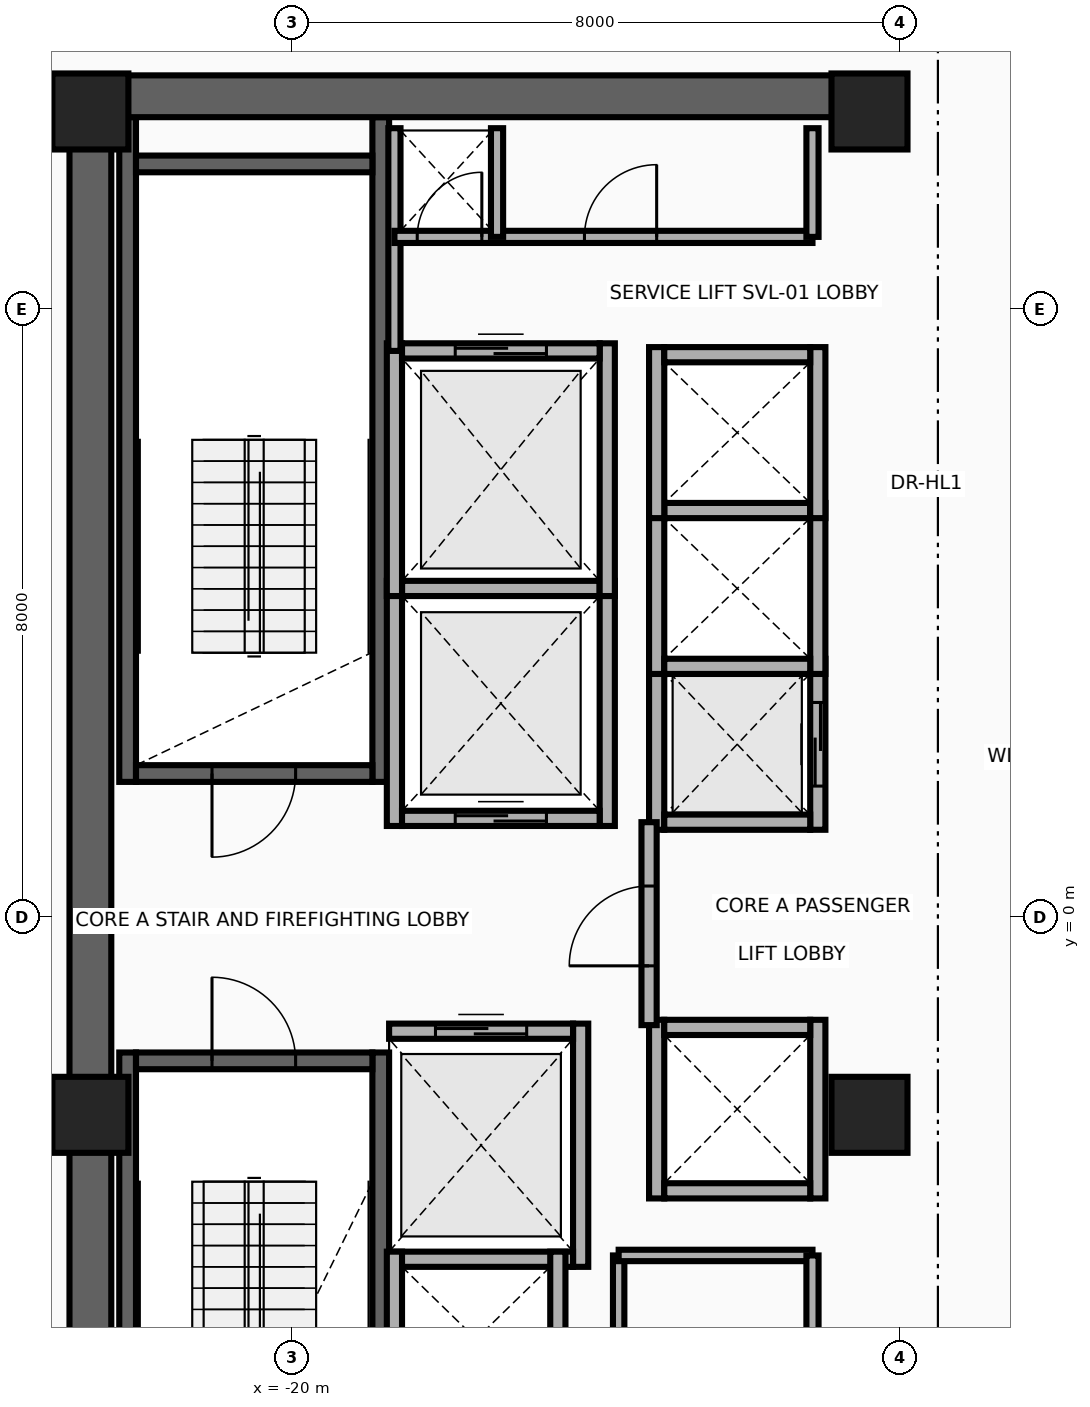
"""IFC4 building model, lengths in metres.
Left out: names, types, materials, properties, quantities, classifications, styles, units other than length and angle.
Written with IfcOpenShell. Run it as: python <this file> out.ifc"""

import sys

from ifc_helpers import new_model, si_unit, direction, frame, frame_2d, origin, origin_2d, place, context, subcontext, project, spatial, rectangle, extrude, source, transform, mapped, element, fill, save


model = new_model("IFC4")
c1 = context("Model", 3, precision=1e-05, world=origin(), true_north=direction((0.0, 1.0)))
c2 = subcontext(c1, "Body", "Model", "MODEL_VIEW")
j1 = project(units=[si_unit("LENGTHUNIT", "METRE"), si_unit("PLANEANGLEUNIT", "RADIAN")], contexts=[c1])
p1 = place(None, origin())
s1 = spatial("IfcSite", under=j1, at=p1, CompositionType="ELEMENT")
p2 = place(p1, origin())
s2 = spatial("IfcBuilding", under=s1, at=p2, CompositionType="ELEMENT")
p3 = place(p2, frame((0.0, 0.0, 188.4)))
s3 = spatial("IfcBuildingStorey", under=s2, at=p3, CompositionType="ELEMENT", Elevation=188.4)
for number, where, z_axis, x_axis in (
    (1, (-22.16, 1.78, 0.0), (0.0, 0.0, 1.0), (0.0, 1.0, 0.0)),
    (2, (-18.83, 1.78, 0.0), (0.0, 0.0, 1.0), (0.0, 1.0, 0.0)),
):
    element("IfcWall", number, at=place(p3, frame(where, z_axis=z_axis, x_axis=x_axis)), inside=s3, PredefinedType="SHEAR", context=c2, shape_type="SweptSolid", body=[
        extrude(rectangle(XDim=8.745, YDim=0.22, at=frame_2d((4.373, 0.0))), origin(), (0.0, 0.0, 1.0), 3.63),
    ])
p4 = place(p3, frame((-22.05, 1.89, 0.0), z_axis=(0.0, 0.0, 1.0), x_axis=(1.0, 0.0, 0.0)))
e3 = element("IfcWall", 3, at=p4, inside=s3, PredefinedType="SHEAR", context=c2, shape_type="SweptSolid", body=[
    extrude(rectangle(XDim=3.11, YDim=0.22, at=frame_2d((1.555, 0.0))), origin(), (0.0, 0.0, 1.0), 3.63),
])
p5 = place(p4, frame((1.0, 0.0, 0.0)))
e4 = element("IfcOpeningElement", 4, at=p5, cuts=e3, PredefinedType="OPENING", context=c2, shape_type="SweptSolid", body=[
    extrude(rectangle(XDim=1.1, YDim=2.15, at=frame_2d((0.55, 1.075))), frame((0.0, 0.125, 0.0), z_axis=(0.0, -1.0, 0.0), x_axis=(1.0, 0.0, 0.0)), (0.0, 0.0, 1.0), 0.25),
])
p6 = place(p3, frame((-22.05, 9.91, 0.0), z_axis=(0.0, 0.0, 1.0), x_axis=(1.0, 0.0, 0.0)))
e5 = element("IfcWall", 5, at=p6, inside=s3, PredefinedType="SHEAR", context=c2, shape_type="SweptSolid", body=[
    extrude(rectangle(XDim=3.11, YDim=0.22, at=frame_2d((1.555, 0.0))), origin(), (0.0, 0.0, 1.0), 3.63),
])
for number, where, z_axis, x_axis in (
    (6, (-22.16, -10.525, 0.0), (0.0, 0.0, 1.0), (0.0, 1.0, 0.0)),
    (7, (-18.83, -10.525, 0.0), (0.0, 0.0, 1.0), (0.0, 1.0, 0.0)),
):
    element("IfcWall", number, at=place(p3, frame(where, z_axis=z_axis, x_axis=x_axis)), inside=s3, PredefinedType="SHEAR", context=c2, shape_type="SweptSolid", body=[
        extrude(rectangle(XDim=8.745, YDim=0.22, at=frame_2d((4.373, 0.0))), origin(), (0.0, 0.0, 1.0), 3.63),
    ])
p7 = place(p3, frame((-22.05, -1.89, 0.0), z_axis=(0.0, 0.0, 1.0), x_axis=(1.0, 0.0, 0.0)))
e8 = element("IfcWall", 8, at=p7, inside=s3, PredefinedType="SHEAR", context=c2, shape_type="SweptSolid", body=[
    extrude(rectangle(XDim=3.11, YDim=0.22, at=frame_2d((1.555, 0.0))), origin(), (0.0, 0.0, 1.0), 3.63),
])
p8 = place(p7, frame((1.0, 0.0, 0.0)))
e9 = element("IfcOpeningElement", 9, at=p8, cuts=e8, PredefinedType="OPENING", context=c2, shape_type="SweptSolid", body=[
    extrude(rectangle(XDim=1.1, YDim=2.15, at=frame_2d((0.55, 1.075))), frame((0.0, 0.125, 0.0), z_axis=(0.0, -1.0, 0.0), x_axis=(1.0, 0.0, 0.0)), (0.0, 0.0, 1.0), 0.25),
])
p9 = place(p3, frame((-22.65, -11.075, 0.0), z_axis=(0.0, 0.0, 1.0), x_axis=(0.0, 1.0, 0.0)))
e10 = element("IfcWall", 10, at=p9, inside=s3, PredefinedType="SHEAR", context=c2, shape_type="SweptSolid", body=[
    extrude(rectangle(XDim=22.15, YDim=0.55, at=frame_2d((11.075, 0.0))), origin(), (0.0, 0.0, 1.0), 3.63),
])
p10 = place(p3, frame((-22.65, 10.8, 0.0), z_axis=(0.0, 0.0, 1.0), x_axis=(1.0, 0.0, 0.0)))
e11 = element("IfcWall", 11, at=p10, inside=s3, PredefinedType="SHEAR", context=c2, shape_type="SweptSolid", body=[
    extrude(rectangle(XDim=10.25, YDim=0.55, at=frame_2d((5.125, 0.0))), origin(), (0.0, 0.0, 1.0), 3.63),
])
m1 = source(origin(), c2, "Body", "SweptSolid", [
    extrude(rectangle(XDim=1.0, YDim=1.0, at=origin_2d()), origin(), (0.0, 0.0, 1.0), 3.95),
])
for number, where, z_axis, x_axis in (
    (12, (-22.65, -2.6, 0.0), (0.0, 0.0, 1.0), (1.0, 0.0, 0.0)),
    (13, (-12.4, -2.6, 0.0), (0.0, 0.0, 1.0), (1.0, 0.0, 0.0)),
    (14, (-22.65, 10.6, 0.0), (0.0, 0.0, 1.0), (1.0, 0.0, 0.0)),
    (15, (-12.4, 10.6, 0.0), (0.0, 0.0, 1.0), (1.0, 0.0, 0.0)),
):
    element("IfcColumn", number, at=place(p3, frame(where, z_axis=z_axis, x_axis=x_axis)), inside=s3, PredefinedType="COLUMN", context=c2, shape_type="MappedRepresentation", body=[
        mapped(m1, transform((0.0, 0.0, 0.0), x_axis=(1.0, 0.0, 0.0), y_axis=(0.0, 1.0, 0.0), z_axis=(0.0, 0.0, 1.0), scale=1.0)),
    ])
for number, where, z_axis, x_axis in (
    (16, (-18.65, 1.2, 0.0), (0.0, 0.0, 1.0), (0.0, 1.0, 0.0)),
    (17, (-15.85, 1.2, 0.0), (0.0, 0.0, 1.0), (0.0, 1.0, 0.0)),
):
    element("IfcWall", number, at=place(p3, frame(where, z_axis=z_axis, x_axis=x_axis)), inside=s3, PredefinedType="MOVABLE", context=c2, shape_type="SweptSolid", body=[
        extrude(rectangle(XDim=3.225, YDim=0.2, at=frame_2d((1.613, 0.0))), origin(), (0.0, 0.0, 1.0), 3.63),
    ])
p11 = place(p3, frame((-18.55, 1.3, 0.0), z_axis=(0.0, 0.0, 1.0), x_axis=(1.0, 0.0, 0.0)))
e18 = element("IfcWall", 18, at=p11, inside=s3, PredefinedType="MOVABLE", context=c2, shape_type="SweptSolid", body=[
    extrude(rectangle(XDim=2.6, YDim=0.2, at=frame_2d((1.3, 0.0))), origin(), (0.0, 0.0, 1.0), 3.63),
])
p12 = place(p11, frame((0.7, 0.0, 0.0)))
e19 = element("IfcOpeningElement", 19, at=p12, cuts=e18, PredefinedType="OPENING", context=c2, shape_type="SweptSolid", body=[
    extrude(rectangle(XDim=1.2, YDim=2.1, at=frame_2d((0.6, 1.05))), frame((0.0, 0.115, 0.0), z_axis=(0.0, -1.0, 0.0), x_axis=(1.0, 0.0, 0.0)), (0.0, 0.0, 1.0), 0.23),
])
p13 = place(p3, frame((-18.55, 4.325, 0.0), z_axis=(0.0, 0.0, 1.0), x_axis=(1.0, 0.0, 0.0)))
e20 = element("IfcWall", 20, at=p13, inside=s3, PredefinedType="MOVABLE", context=c2, shape_type="SweptSolid", body=[
    extrude(rectangle(XDim=2.6, YDim=0.2, at=frame_2d((1.3, 0.0))), origin(), (0.0, 0.0, 1.0), 3.63),
])
p14 = place(p3, frame((-16.2, -4.6, 0.0), z_axis=(0.0, 0.0, 1.0), x_axis=(0.0, 1.0, 0.0)))
e21 = element("IfcWall", 21, at=p14, inside=s3, PredefinedType="MOVABLE", context=c2, shape_type="SweptSolid", body=[
    extrude(rectangle(XDim=3.2, YDim=0.2, at=frame_2d((1.6, 0.0))), origin(), (0.0, 0.0, 1.0), 3.63),
])
p15 = place(p3, frame((-18.72, -4.5, 0.0), z_axis=(0.0, 0.0, 1.0), x_axis=(1.0, 0.0, 0.0)))
e22 = element("IfcWall", 22, at=p15, inside=s3, PredefinedType="MOVABLE", context=c2, shape_type="SweptSolid", body=[
    extrude(rectangle(XDim=2.42, YDim=0.2, at=frame_2d((1.21, 0.0))), origin(), (0.0, 0.0, 1.0), 3.63),
])
p16 = place(p3, frame((-18.72, -1.5, 0.0), z_axis=(0.0, 0.0, 1.0), x_axis=(1.0, 0.0, 0.0)))
e23 = element("IfcWall", 23, at=p16, inside=s3, PredefinedType="MOVABLE", context=c2, shape_type="SweptSolid", body=[
    extrude(rectangle(XDim=2.42, YDim=0.2, at=frame_2d((1.21, 0.0))), origin(), (0.0, 0.0, 1.0), 3.63),
])
p17 = place(p16, frame((0.61, 0.0, 0.0)))
e24 = element("IfcOpeningElement", 24, at=p17, cuts=e23, PredefinedType="OPENING", context=c2, shape_type="SweptSolid", body=[
    extrude(rectangle(XDim=1.2, YDim=2.1, at=frame_2d((0.6, 1.05))), frame((0.0, 0.115, 0.0), z_axis=(0.0, -1.0, 0.0), x_axis=(1.0, 0.0, 0.0)), (0.0, 0.0, 1.0), 0.23),
])
for number, where, z_axis, x_axis in (
    (25, (-18.65, 4.225, 0.0), (0.0, 0.0, 1.0), (0.0, 1.0, 0.0)),
    (26, (-15.85, 4.225, 0.0), (0.0, 0.0, 1.0), (0.0, 1.0, 0.0)),
):
    element("IfcWall", number, at=place(p3, frame(where, z_axis=z_axis, x_axis=x_axis)), inside=s3, PredefinedType="MOVABLE", context=c2, shape_type="SweptSolid", body=[
        extrude(rectangle(XDim=3.325, YDim=0.2, at=frame_2d((1.663, 0.0))), origin(), (0.0, 0.0, 1.0), 3.63),
    ])
p18 = place(p3, frame((-18.55, 7.45, 0.0), z_axis=(0.0, 0.0, 1.0), x_axis=(1.0, 0.0, 0.0)))
e27 = element("IfcWall", 27, at=p18, inside=s3, PredefinedType="MOVABLE", context=c2, shape_type="SweptSolid", body=[
    extrude(rectangle(XDim=2.6, YDim=0.2, at=frame_2d((1.3, 0.0))), origin(), (0.0, 0.0, 1.0), 3.63),
])
p19 = place(p18, frame((0.7, 0.0, 0.0)))
e28 = element("IfcOpeningElement", 28, at=p19, cuts=e27, PredefinedType="OPENING", context=c2, shape_type="SweptSolid", body=[
    extrude(rectangle(XDim=1.2, YDim=2.1, at=frame_2d((0.6, 1.05))), frame((0.0, 0.115, 0.0), z_axis=(0.0, -1.0, 0.0), x_axis=(1.0, 0.0, 0.0)), (0.0, 0.0, 1.0), 0.23),
])
p20 = place(p3, frame((-15.2, 1.15, 0.0), z_axis=(0.0, 0.0, 1.0), x_axis=(0.0, 1.0, 0.0)))
e29 = element("IfcWall", 29, at=p20, inside=s3, PredefinedType="MOVABLE", context=c2, shape_type="SweptSolid", body=[
    extrude(rectangle(XDim=2.25, YDim=0.2, at=frame_2d((1.125, 0.0))), origin(), (0.0, 0.0, 1.0), 3.63),
])
p21 = place(p3, frame((-13.08, 1.15, 0.0), z_axis=(0.0, 0.0, 1.0), x_axis=(0.0, 1.0, 0.0)))
e30 = element("IfcWall", 30, at=p21, inside=s3, PredefinedType="MOVABLE", context=c2, shape_type="SweptSolid", body=[
    extrude(rectangle(XDim=2.25, YDim=0.2, at=frame_2d((1.125, 0.0))), origin(), (0.0, 0.0, 1.0), 3.63),
])
p22 = place(p21, frame((0.575, 0.0, 0.0)))
e31 = element("IfcOpeningElement", 31, at=p22, cuts=e30, PredefinedType="OPENING", context=c2, shape_type="SweptSolid", body=[
    extrude(rectangle(XDim=1.1, YDim=2.1, at=frame_2d((0.55, 1.05))), frame((0.0, 0.115, 0.0), z_axis=(0.0, -1.0, 0.0), x_axis=(1.0, 0.0, 0.0)), (0.0, 0.0, 1.0), 0.23),
])
p23 = place(p3, frame((-15.1, 1.25, 0.0), z_axis=(0.0, 0.0, 1.0), x_axis=(1.0, 0.0, 0.0)))
e32 = element("IfcWall", 32, at=p23, inside=s3, PredefinedType="MOVABLE", context=c2, shape_type="SweptSolid", body=[
    extrude(rectangle(XDim=1.92, YDim=0.2, at=frame_2d((0.96, 0.0))), origin(), (0.0, 0.0, 1.0), 3.63),
])
for number, where, z_axis, x_axis in (
    (33, (-15.2, 3.2, 0.0), (0.0, 0.0, 1.0), (0.0, 1.0, 0.0)),
    (34, (-13.08, 3.2, 0.0), (0.0, 0.0, 1.0), (0.0, 1.0, 0.0)),
):
    element("IfcWall", number, at=place(p3, frame(where, z_axis=z_axis, x_axis=x_axis)), inside=s3, PredefinedType="MOVABLE", context=c2, shape_type="SweptSolid", body=[
        extrude(rectangle(XDim=2.25, YDim=0.2, at=frame_2d((1.125, 0.0))), origin(), (0.0, 0.0, 1.0), 3.63),
    ])
for number, where, z_axis, x_axis in (
    (35, (-15.1, 3.3, 0.0), (0.0, 0.0, 1.0), (1.0, 0.0, 0.0)),
    (36, (-15.1, 5.35, 0.0), (0.0, 0.0, 1.0), (1.0, 0.0, 0.0)),
):
    element("IfcWall", number, at=place(p3, frame(where, z_axis=z_axis, x_axis=x_axis)), inside=s3, PredefinedType="MOVABLE", context=c2, shape_type="SweptSolid", body=[
        extrude(rectangle(XDim=1.92, YDim=0.2, at=frame_2d((0.96, 0.0))), origin(), (0.0, 0.0, 1.0), 3.63),
    ])
for number, where, z_axis, x_axis in (
    (37, (-15.2, 5.25, 0.0), (0.0, 0.0, 1.0), (0.0, 1.0, 0.0)),
    (38, (-13.08, 5.25, 0.0), (0.0, 0.0, 1.0), (0.0, 1.0, 0.0)),
):
    element("IfcWall", number, at=place(p3, frame(where, z_axis=z_axis, x_axis=x_axis)), inside=s3, PredefinedType="MOVABLE", context=c2, shape_type="SweptSolid", body=[
        extrude(rectangle(XDim=2.25, YDim=0.2, at=frame_2d((1.125, 0.0))), origin(), (0.0, 0.0, 1.0), 3.63),
    ])
p24 = place(p3, frame((-15.1, 7.4, 0.0), z_axis=(0.0, 0.0, 1.0), x_axis=(1.0, 0.0, 0.0)))
e39 = element("IfcWall", 39, at=p24, inside=s3, PredefinedType="MOVABLE", context=c2, shape_type="SweptSolid", body=[
    extrude(rectangle(XDim=1.92, YDim=0.2, at=frame_2d((0.96, 0.0))), origin(), (0.0, 0.0, 1.0), 3.63),
])
for number, where, z_axis, x_axis in (
    (40, (-18.65, -6.7, 0.0), (0.0, 0.0, 1.0), (0.0, 1.0, 0.0)),
    (41, (-16.5, -6.7, 0.0), (0.0, 0.0, 1.0), (0.0, 1.0, 0.0)),
):
    element("IfcWall", number, at=place(p3, frame(where, z_axis=z_axis, x_axis=x_axis)), inside=s3, PredefinedType="MOVABLE", context=c2, shape_type="SweptSolid", body=[
        extrude(rectangle(XDim=2.3, YDim=0.2, at=frame_2d((1.15, 0.0))), origin(), (0.0, 0.0, 1.0), 3.63),
    ])
for number, where, z_axis, x_axis in (
    (42, (-15.2, -3.7, 0.0), (0.0, 0.0, 1.0), (0.0, 1.0, 0.0)),
    (43, (-13.08, -3.7, 0.0), (0.0, 0.0, 1.0), (0.0, 1.0, 0.0)),
):
    element("IfcWall", number, at=place(p3, frame(where, z_axis=z_axis, x_axis=x_axis)), inside=s3, PredefinedType="MOVABLE", context=c2, shape_type="SweptSolid", body=[
        extrude(rectangle(XDim=2.35, YDim=0.2, at=frame_2d((1.175, 0.0))), origin(), (0.0, 0.0, 1.0), 3.63),
    ])
for number, where, z_axis, x_axis in (
    (44, (-15.1, -3.6, 0.0), (0.0, 0.0, 1.0), (1.0, 0.0, 0.0)),
    (45, (-15.1, -1.45, 0.0), (0.0, 0.0, 1.0), (1.0, 0.0, 0.0)),
):
    element("IfcWall", number, at=place(p3, frame(where, z_axis=z_axis, x_axis=x_axis)), inside=s3, PredefinedType="MOVABLE", context=c2, shape_type="SweptSolid", body=[
        extrude(rectangle(XDim=1.92, YDim=0.2, at=frame_2d((0.96, 0.0))), origin(), (0.0, 0.0, 1.0), 3.63),
    ])
p25 = place(p3, frame((-15.3, -1.42, 0.0), z_axis=(0.0, 0.0, 1.0), x_axis=(0.0, 1.0, 0.0)))
e46 = element("IfcWall", 46, at=p25, inside=s3, PredefinedType="PARTITIONING", context=c2, shape_type="SweptSolid", body=[
    extrude(rectangle(XDim=2.67, YDim=0.2, at=frame_2d((1.335, 0.0))), origin(), (0.0, 0.0, 1.0), 3.63),
])
p26 = place(p25, frame((0.78, 0.0, 0.0)))
e47 = element("IfcOpeningElement", 47, at=p26, cuts=e46, PredefinedType="OPENING", context=c2, shape_type="SweptSolid", body=[
    extrude(rectangle(XDim=1.05, YDim=2.15, at=frame_2d((0.525, 1.075))), frame((0.0, 0.115, 0.0), z_axis=(0.0, -1.0, 0.0), x_axis=(1.0, 0.0, 0.0)), (0.0, 0.0, 1.0), 0.23),
])
p27 = place(p3, frame((-18.65, 7.45, 0.0), z_axis=(0.0, 0.0, 1.0), x_axis=(0.0, 1.0, 0.0)))
e48 = element("IfcWall", 48, at=p27, inside=s3, PredefinedType="PARTITIONING", context=c2, shape_type="SweptSolid", body=[
    extrude(rectangle(XDim=2.93, YDim=0.16, at=frame_2d((1.465, 0.0))), origin(), (0.0, 0.0, 1.0), 3.63),
])
p28 = place(p3, frame((-18.65, 8.95, 0.0), z_axis=(0.0, 0.0, 1.0), x_axis=(1.0, 0.0, 0.0)))
e49 = element("IfcWall", 49, at=p28, inside=s3, PredefinedType="PARTITIONING", context=c2, shape_type="SweptSolid", body=[
    extrude(rectangle(XDim=5.5, YDim=0.16, at=frame_2d((2.75, 0.0))), origin(), (0.0, 0.0, 1.0), 3.63),
])
p29 = place(p28, frame((0.3, 0.0, 0.0)))
e50 = element("IfcOpeningElement", 50, at=p29, cuts=e49, PredefinedType="OPENING", context=c2, shape_type="SweptSolid", body=[
    extrude(rectangle(XDim=0.85, YDim=2.05, at=frame_2d((0.425, 1.025))), frame((0.0, 0.095, 0.0), z_axis=(0.0, -1.0, 0.0), x_axis=(1.0, 0.0, 0.0)), (0.0, 0.0, 1.0), 0.19),
])
p30 = place(p28, frame((2.5, 0.0, 0.0)))
e51 = element("IfcOpeningElement", 51, at=p30, cuts=e49, PredefinedType="OPENING", context=c2, shape_type="SweptSolid", body=[
    extrude(rectangle(XDim=0.95, YDim=2.15, at=frame_2d((0.475, 1.075))), frame((0.0, 0.095, 0.0), z_axis=(0.0, -1.0, 0.0), x_axis=(1.0, 0.0, 0.0)), (0.0, 0.0, 1.0), 0.19),
])
for number, where, z_axis, x_axis in (
    (52, (-13.15, 8.95, 0.0), (0.0, 0.0, 1.0), (0.0, 1.0, 0.0)),
    (53, (-17.3, 8.95, 0.0), (0.0, 0.0, 1.0), (0.0, 1.0, 0.0)),
):
    element("IfcWall", number, at=place(p3, frame(where, z_axis=z_axis, x_axis=x_axis)), inside=s3, PredefinedType="PARTITIONING", context=c2, shape_type="SweptSolid", body=[
        extrude(rectangle(XDim=1.43, YDim=0.16, at=frame_2d((0.715, 0.0))), origin(), (0.0, 0.0, 1.0), 3.63),
    ])
p31 = place(p3, frame((-15.7, -6.58, 0.0), z_axis=(0.0, 0.0, 1.0), x_axis=(0.0, 1.0, 0.0)))
e54 = element("IfcWall", 54, at=p31, inside=s3, PredefinedType="PARTITIONING", context=c2, shape_type="SweptSolid", body=[
    extrude(rectangle(XDim=2.13, YDim=0.15, at=frame_2d((1.065, 0.0))), origin(), (0.0, 0.0, 1.0), 3.63),
])
p32 = place(p3, frame((-15.7, -4.45, 0.0), z_axis=(0.0, 0.0, 1.0), x_axis=(1.0, 0.0, 0.0)))
e55 = element("IfcWall", 55, at=p32, inside=s3, PredefinedType="PARTITIONING", context=c2, shape_type="SweptSolid", body=[
    extrude(rectangle(XDim=2.55, YDim=0.15, at=frame_2d((1.275, 0.0))), origin(), (0.0, 0.0, 1.0), 3.63),
])
p33 = place(p3, frame((-13.15, -6.58, 0.0), z_axis=(0.0, 0.0, 1.0), x_axis=(0.0, 1.0, 0.0)))
e56 = element("IfcWall", 56, at=p33, inside=s3, PredefinedType="PARTITIONING", context=c2, shape_type="SweptSolid", body=[
    extrude(rectangle(XDim=2.13, YDim=0.16, at=frame_2d((1.065, 0.0))), origin(), (0.0, 0.0, 1.0), 3.63),
])
p34 = place(p12, origin())
e57 = element("IfcDoor", 57, at=p34, inside=s3, OperationType="DOUBLE_DOOR_SLIDING", PredefinedType="DOOR", context=c2, shape_type="SweptSolid", body=[
    extrude(rectangle(XDim=1.2, YDim=2.1, at=frame_2d((0.6, 1.05))), frame((0.0, 0.025, 0.0), z_axis=(0.0, -1.0, 0.0), x_axis=(1.0, 0.0, 0.0)), (0.0, 0.0, 1.0), 0.05),
])
fill(e19, e57)
p35 = place(p17, origin())
e58 = element("IfcDoor", 58, at=p35, inside=s3, OperationType="DOUBLE_DOOR_SLIDING", PredefinedType="DOOR", context=c2, shape_type="SweptSolid", body=[
    extrude(rectangle(XDim=1.2, YDim=2.1, at=frame_2d((0.6, 1.05))), frame((0.0, 0.025, 0.0), z_axis=(0.0, -1.0, 0.0), x_axis=(1.0, 0.0, 0.0)), (0.0, 0.0, 1.0), 0.05),
])
fill(e24, e58)
p36 = place(p19, origin())
e59 = element("IfcDoor", 59, at=p36, inside=s3, OperationType="DOUBLE_DOOR_SLIDING", PredefinedType="DOOR", context=c2, shape_type="SweptSolid", body=[
    extrude(rectangle(XDim=1.2, YDim=2.1, at=frame_2d((0.6, 1.05))), frame((0.0, 0.025, 0.0), z_axis=(0.0, -1.0, 0.0), x_axis=(1.0, 0.0, 0.0)), (0.0, 0.0, 1.0), 0.05),
])
fill(e28, e59)
p37 = place(p22, origin())
e60 = element("IfcDoor", 60, at=p37, inside=s3, OperationType="DOUBLE_DOOR_SLIDING", PredefinedType="DOOR", context=c2, shape_type="SweptSolid", body=[
    extrude(rectangle(XDim=1.1, YDim=2.1, at=frame_2d((0.55, 1.05))), frame((0.0, 0.025, 0.0), z_axis=(0.0, -1.0, 0.0), x_axis=(1.0, 0.0, 0.0)), (0.0, 0.0, 1.0), 0.05),
])
fill(e31, e60)
p38 = place(p26, origin())
e61 = element("IfcDoor", 61, at=p38, inside=s3, OperationType="SINGLE_SWING_RIGHT", PredefinedType="DOOR", context=c2, shape_type="SweptSolid", body=[
    extrude(rectangle(XDim=1.05, YDim=2.15, at=frame_2d((0.525, 1.075))), frame((0.0, 0.025, 0.0), z_axis=(0.0, -1.0, 0.0), x_axis=(1.0, 0.0, 0.0)), (0.0, 0.0, 1.0), 0.05),
])
fill(e47, e61)
p39 = place(p5, frame((1.1, 0.0, 0.0), z_axis=(0.0, 0.0, 1.0), x_axis=(-1.0, 0.0, 0.0)))
e62 = element("IfcDoor", 62, at=p39, inside=s3, OperationType="SINGLE_SWING_LEFT", PredefinedType="DOOR", context=c2, shape_type="SweptSolid", body=[
    extrude(rectangle(XDim=1.1, YDim=2.15, at=frame_2d((0.55, 1.075))), frame((0.0, 0.025, 0.0), z_axis=(0.0, -1.0, 0.0), x_axis=(1.0, 0.0, 0.0)), (0.0, 0.0, 1.0), 0.05),
])
fill(e4, e62)
p40 = place(p8, origin())
e63 = element("IfcDoor", 63, at=p40, inside=s3, OperationType="SINGLE_SWING_RIGHT", PredefinedType="DOOR", context=c2, shape_type="SweptSolid", body=[
    extrude(rectangle(XDim=1.1, YDim=2.15, at=frame_2d((0.55, 1.075))), frame((0.0, 0.025, 0.0), z_axis=(0.0, -1.0, 0.0), x_axis=(1.0, 0.0, 0.0)), (0.0, 0.0, 1.0), 0.05),
])
fill(e9, e63)
p41 = place(p29, origin())
e64 = element("IfcDoor", 64, at=p41, inside=s3, OperationType="SINGLE_SWING_LEFT", PredefinedType="DOOR", context=c2, shape_type="SweptSolid", body=[
    extrude(rectangle(XDim=0.85, YDim=2.05, at=frame_2d((0.425, 1.025))), frame((0.0, 0.025, 0.0), z_axis=(0.0, -1.0, 0.0), x_axis=(1.0, 0.0, 0.0)), (0.0, 0.0, 1.0), 0.05),
])
fill(e50, e64)
p42 = place(p30, origin())
e65 = element("IfcDoor", 65, at=p42, inside=s3, OperationType="SINGLE_SWING_RIGHT", PredefinedType="DOOR", context=c2, shape_type="SweptSolid", body=[
    extrude(rectangle(XDim=0.95, YDim=2.15, at=frame_2d((0.475, 1.075))), frame((0.0, 0.025, 0.0), z_axis=(0.0, -1.0, 0.0), x_axis=(1.0, 0.0, 0.0)), (0.0, 0.0, 1.0), 0.05),
])
fill(e51, e65)
save(model, sys.argv[1])
